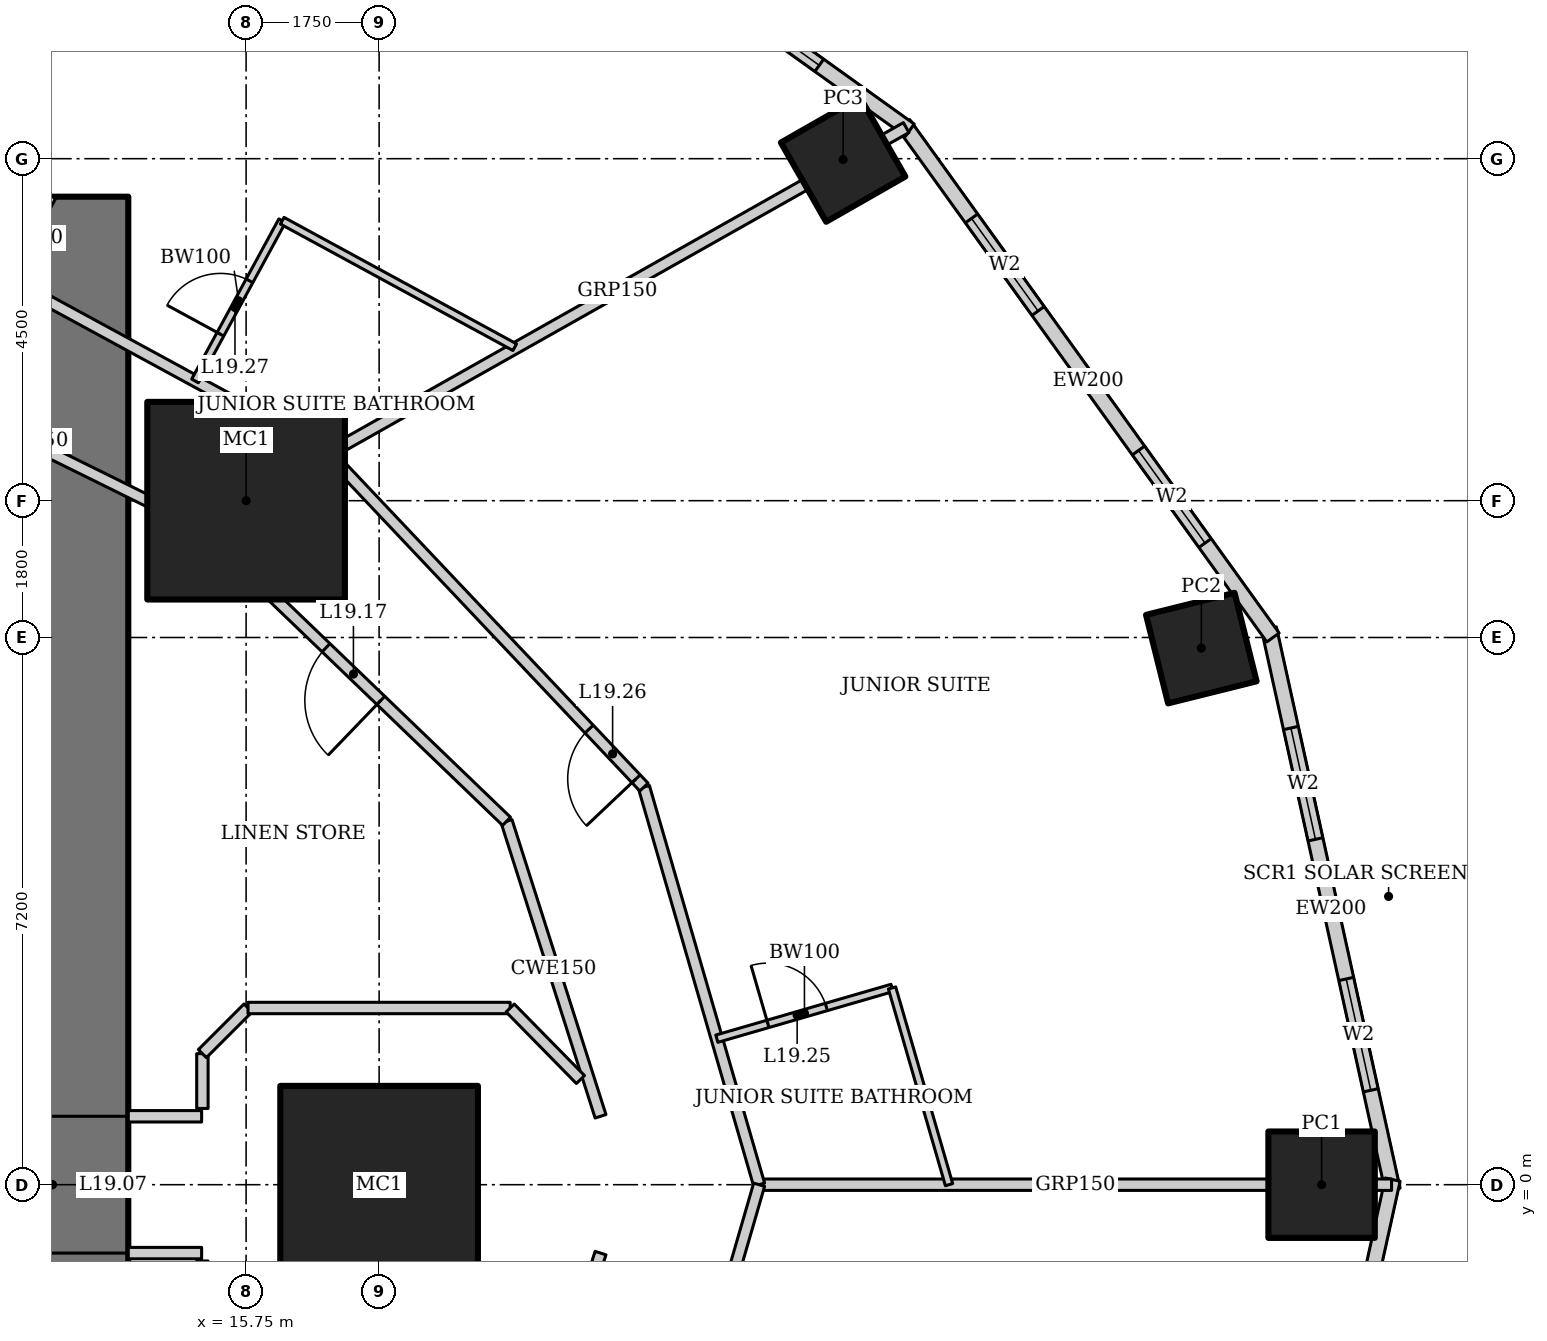
"""IFC4 building model, lengths in metres.
Left out: names, types, materials, properties, quantities, classifications, styles, units other than length and angle.
Written with IfcOpenShell. Run it as: python <this file> out.ifc"""

import sys

from ifc_helpers import new_model, si_unit, direction, frame, frame_2d, origin, origin_2d, place, context, subcontext, project, spatial, rectangle, hollow_rectangle, extrude, element, fill, save


model = new_model("IFC4")
c1 = context("Model", 3, precision=1e-05, world=origin(), true_north=direction((0.0, 1.0)))
c2 = subcontext(c1, "Body", "Model", "MODEL_VIEW")
j1 = project(units=[si_unit("LENGTHUNIT", "METRE"), si_unit("PLANEANGLEUNIT", "RADIAN")], contexts=[c1])
p1 = place(None, origin())
s1 = spatial("IfcSite", under=j1, at=p1, CompositionType="ELEMENT")
p2 = place(p1, origin())
s2 = spatial("IfcBuilding", under=s1, at=p2, CompositionType="ELEMENT")
p3 = place(p2, frame((0.0, 0.0, 83.8)))
s3 = spatial("IfcBuildingStorey", under=s2, at=p3, CompositionType="ELEMENT", Elevation=83.8)
for number, where, z_axis, x_axis in (
    (1, (17.5, 0.0, 0.0), (0.0, 0.0, 1.0), (1.0, 0.0, 0.0)),
    (2, (15.75, 9.0, 0.0), (0.0, 0.0, 1.0), (1.0, 0.0, 0.0)),
):
    element("IfcColumn", number, at=place(p3, frame(where, z_axis=z_axis, x_axis=x_axis)), inside=s3, PredefinedType="COLUMN", context=c2, shape_type="SweptSolid", body=[
        extrude(hollow_rectangle(XDim=2.6, YDim=2.6, WallThickness=0.13, at=origin_2d()), origin(), (0.0, 0.0, 1.0), 3.6),
    ])
p4 = place(p3, frame((29.9, 0.0, 0.0), z_axis=(0.0, 0.0, 1.0), x_axis=(1.0, 0.0, 0.0)))
e3 = element("IfcColumn", 3, at=p4, inside=s3, PredefinedType="COLUMN", context=c2, shape_type="SweptSolid", body=[
    extrude(hollow_rectangle(XDim=1.4, YDim=1.4, WallThickness=0.1, at=origin_2d()), origin(), (0.0, 0.0, 1.0), 3.6),
])
p5 = place(p3, frame((28.318, 7.06, 0.0), z_axis=(0.0, 0.0, 1.0), x_axis=(0.970295726276, 0.2419218956, 0.0)))
e4 = element("IfcColumn", 4, at=p5, inside=s3, PredefinedType="COLUMN", context=c2, shape_type="SweptSolid", body=[
    extrude(hollow_rectangle(XDim=1.2, YDim=1.2, WallThickness=0.1, at=origin_2d()), origin(), (0.0, 0.0, 1.0), 3.6),
])
p6 = place(p3, frame((23.605, 13.489, 0.0), z_axis=(0.0, 0.0, 1.0), x_axis=(0.86824298017, 0.496139221777, 0.0)))
e5 = element("IfcColumn", 5, at=p6, inside=s3, PredefinedType="COLUMN", context=c2, shape_type="SweptSolid", body=[
    extrude(hollow_rectangle(XDim=1.2, YDim=1.2, WallThickness=0.12, at=origin_2d()), origin(), (0.0, 0.0, 1.0), 3.6),
])
p7 = place(p3, frame((13.2, -13.0, 0.0), z_axis=(0.0, 0.0, 1.0), x_axis=(0.0, 1.0, 0.0)))
e6 = element("IfcWall", 6, at=p7, inside=s3, PredefinedType="SHEAR", context=c2, shape_type="SweptSolid", body=[
    extrude(rectangle(XDim=26.0, YDim=2.0, at=frame_2d((13.0, 0.0))), origin(), (0.0, 0.0, 1.0), 3.6),
])
p8 = place(p7, frame((12.1, 0.0, 0.0)))
e7 = element("IfcOpeningElement", 7, at=p8, cuts=e6, PredefinedType="OPENING", context=c2, shape_type="SweptSolid", body=[
    extrude(rectangle(XDim=1.8, YDim=2.1, at=frame_2d((0.9, 1.05))), frame((0.0, 1.01, 0.0), z_axis=(0.0, -1.0, 0.0), x_axis=(1.0, 0.0, 0.0)), (0.0, 0.0, 1.0), 2.02),
])
p9 = place(p3, frame((30.835, -0.067, 0.0), z_axis=(0.0, 0.0, 1.0), x_axis=(-0.215238065514, 0.976561608478, 0.0)))
e8 = element("IfcWall", 8, at=p9, inside=s3, PredefinedType="SOLIDWALL", context=c2, shape_type="SweptSolid", body=[
    extrude(rectangle(XDim=7.562, YDim=0.2, at=frame_2d((3.781, 0.0))), origin(), (0.0, 0.0, 1.0), 3.45),
])
p10 = place(p9, frame((1.341, 0.0, 0.5)))
e9 = element("IfcOpeningElement", 9, at=p10, cuts=e8, PredefinedType="OPENING", context=c2, shape_type="SweptSolid", body=[
    extrude(rectangle(XDim=1.5, YDim=2.2, at=frame_2d((0.75, 1.1))), frame((0.0, 0.11, 0.0), z_axis=(0.0, -1.0, 0.0), x_axis=(1.0, 0.0, 0.0)), (0.0, 0.0, 1.0), 0.22),
])
p11 = place(p9, frame((4.722, 0.0, 0.5)))
e10 = element("IfcOpeningElement", 10, at=p11, cuts=e8, PredefinedType="OPENING", context=c2, shape_type="SweptSolid", body=[
    extrude(rectangle(XDim=1.5, YDim=2.2, at=frame_2d((0.75, 1.1))), frame((0.0, 0.11, 0.0), z_axis=(0.0, -1.0, 0.0), x_axis=(1.0, 0.0, 0.0)), (0.0, 0.0, 1.0), 0.22),
])
p12 = place(p3, frame((29.26, 7.2, 0.0), z_axis=(0.0, 0.0, 1.0), x_axis=(-0.583937613703, 0.811798536155, 0.0)))
e11 = element("IfcWall", 11, at=p12, inside=s3, PredefinedType="SOLIDWALL", context=c2, shape_type="SweptSolid", body=[
    extrude(rectangle(XDim=8.323, YDim=0.2, at=frame_2d((4.162, 0.0))), origin(), (0.0, 0.0, 1.0), 3.45),
])
p13 = place(p12, frame((1.531, 0.0, 0.5)))
e12 = element("IfcOpeningElement", 12, at=p13, cuts=e11, PredefinedType="OPENING", context=c2, shape_type="SweptSolid", body=[
    extrude(rectangle(XDim=1.5, YDim=2.2, at=frame_2d((0.75, 1.1))), frame((0.0, 0.11, 0.0), z_axis=(0.0, -1.0, 0.0), x_axis=(1.0, 0.0, 0.0)), (0.0, 0.0, 1.0), 0.22),
])
p14 = place(p12, frame((5.292, 0.0, 0.5)))
e13 = element("IfcOpeningElement", 13, at=p14, cuts=e11, PredefinedType="OPENING", context=c2, shape_type="SweptSolid", body=[
    extrude(rectangle(XDim=1.5, YDim=2.2, at=frame_2d((0.75, 1.1))), frame((0.0, 0.11, 0.0), z_axis=(0.0, -1.0, 0.0), x_axis=(1.0, 0.0, 0.0)), (0.0, 0.0, 1.0), 0.22),
])
p15 = place(p3, frame((24.482, 13.875, 0.0), z_axis=(0.0, 0.0, 1.0), x_axis=(-0.812791321576, 0.582554948112, 0.0)))
e14 = element("IfcWall", 14, at=p15, inside=s3, PredefinedType="SOLIDWALL", context=c2, shape_type="SweptSolid", body=[
    extrude(rectangle(XDim=8.063, YDim=0.2, at=frame_2d((4.032, 0.0))), origin(), (0.0, 0.0, 1.0), 3.45),
])
p16 = place(p15, frame((1.466, 0.0, 0.5)))
e15 = element("IfcOpeningElement", 15, at=p16, cuts=e14, PredefinedType="OPENING", context=c2, shape_type="SweptSolid", body=[
    extrude(rectangle(XDim=1.5, YDim=2.2, at=frame_2d((0.75, 1.1))), frame((0.0, 0.11, 0.0), z_axis=(0.0, -1.0, 0.0), x_axis=(1.0, 0.0, 0.0)), (0.0, 0.0, 1.0), 0.22),
])
p17 = place(p15, frame((5.097, 0.0, 0.5)))
e16 = element("IfcOpeningElement", 16, at=p17, cuts=e14, PredefinedType="OPENING", context=c2, shape_type="SweptSolid", body=[
    extrude(rectangle(XDim=1.5, YDim=2.2, at=frame_2d((0.75, 1.1))), frame((0.0, 0.11, 0.0), z_axis=(0.0, -1.0, 0.0), x_axis=(1.0, 0.0, 0.0)), (0.0, 0.0, 1.0), 0.22),
])
p18 = place(p3, frame((29.208, -7.318, 0.0), z_axis=(0.0, 0.0, 1.0), x_axis=(0.215238065514, 0.976561608478, 0.0)))
e17 = element("IfcWall", 17, at=p18, inside=s3, PredefinedType="SOLIDWALL", context=c2, shape_type="SweptSolid", body=[
    extrude(rectangle(XDim=7.562, YDim=0.2, at=frame_2d((3.781, 0.0))), origin(), (0.0, 0.0, 1.0), 3.45),
])
p19 = place(p18, frame((1.341, 0.0, 0.5)))
e18 = element("IfcOpeningElement", 18, at=p19, cuts=e17, PredefinedType="OPENING", context=c2, shape_type="SweptSolid", body=[
    extrude(rectangle(XDim=1.5, YDim=2.2, at=frame_2d((0.75, 1.1))), frame((0.0, 0.11, 0.0), z_axis=(0.0, -1.0, 0.0), x_axis=(1.0, 0.0, 0.0)), (0.0, 0.0, 1.0), 0.22),
])
p20 = place(p18, frame((4.722, 0.0, 0.5)))
e19 = element("IfcOpeningElement", 19, at=p20, cuts=e17, PredefinedType="OPENING", context=c2, shape_type="SweptSolid", body=[
    extrude(rectangle(XDim=1.5, YDim=2.2, at=frame_2d((0.75, 1.1))), frame((0.0, 0.11, 0.0), z_axis=(0.0, -1.0, 0.0), x_axis=(1.0, 0.0, 0.0)), (0.0, 0.0, 1.0), 0.22),
])
p21 = place(p3, frame((30.821, 0.0, 0.0), z_axis=(0.0, 0.0, 1.0), x_axis=(-1.0, 0.0, 0.0)))
e20 = element("IfcWall", 20, at=p21, inside=s3, PredefinedType="PARTITIONING", context=c2, shape_type="SweptSolid", body=[
    extrude(rectangle(XDim=8.321, YDim=0.15, at=frame_2d((4.16, 0.0))), origin(), (0.0, 0.0, 1.0), 2.528),
])
p22 = place(p3, frame((24.435, 13.909, 0.0), z_axis=(0.0, 0.0, 1.0), x_axis=(-0.87090601027, -0.491449612143, 0.0)))
e21 = element("IfcWall", 21, at=p22, inside=s3, PredefinedType="PARTITIONING", context=c2, shape_type="SweptSolid", body=[
    extrude(rectangle(XDim=8.726, YDim=0.15, at=frame_2d((4.363, 0.0))), origin(), (0.0, 0.0, 1.0), 2.693),
])
p23 = place(p3, frame((22.5, 0.0, 0.0), z_axis=(0.0, 0.0, 1.0), x_axis=(-0.278247435376, 0.960509429785, 0.0)))
e22 = element("IfcWall", 22, at=p23, inside=s3, PredefinedType="PARTITIONING", context=c2, shape_type="SweptSolid", body=[
    extrude(rectangle(XDim=5.447, YDim=0.15, at=frame_2d((2.724, 0.0))), origin(), (0.0, 0.0, 1.0), 3.45),
])
p24 = place(p3, frame((20.984, 5.232, 0.0), z_axis=(0.0, 0.0, 1.0), x_axis=(-0.687062608696, 0.726598218916, 0.0)))
e23 = element("IfcWall", 23, at=p24, inside=s3, PredefinedType="PARTITIONING", context=c2, shape_type="SweptSolid", body=[
    extrude(rectangle(XDim=6.039, YDim=0.15, at=frame_2d((3.02, 0.0))), origin(), (0.0, 0.0, 1.0), 3.45),
])
p25 = place(p24, frame((0.15, 0.0, 0.0)))
e24 = element("IfcOpeningElement", 24, at=p25, cuts=e23, PredefinedType="OPENING", context=c2, shape_type="SweptSolid", body=[
    extrude(rectangle(XDim=0.9, YDim=2.1, at=frame_2d((0.45, 1.05))), frame((0.0, 0.085, 0.0), z_axis=(0.0, -1.0, 0.0), x_axis=(1.0, 0.0, 0.0)), (0.0, 0.0, 1.0), 0.17),
])
p26 = place(p3, frame((16.835, 9.62, 0.0), z_axis=(0.0, 0.0, 1.0), x_axis=(-0.878450059298, 0.477834169267, 0.0)))
e25 = element("IfcWall", 25, at=p26, inside=s3, PredefinedType="PARTITIONING", context=c2, shape_type="SweptSolid", body=[
    extrude(rectangle(XDim=5.631, YDim=0.15, at=frame_2d((2.815, 0.0))), origin(), (0.0, 0.0, 1.0), 3.45),
])
p27 = place(p3, frame((20.984, -5.232, 0.0), z_axis=(0.0, 0.0, 1.0), x_axis=(0.278247435376, 0.960509429785, 0.0)))
e26 = element("IfcWall", 26, at=p27, inside=s3, PredefinedType="PARTITIONING", context=c2, shape_type="SweptSolid", body=[
    extrude(rectangle(XDim=5.447, YDim=0.15, at=frame_2d((2.724, 0.0))), origin(), (0.0, 0.0, 1.0), 3.45),
])
p28 = place(p27, frame((0.15, 0.0, 0.0)))
e27 = element("IfcOpeningElement", 27, at=p28, cuts=e26, PredefinedType="OPENING", context=c2, shape_type="SweptSolid", body=[
    extrude(rectangle(XDim=0.9, YDim=2.1, at=frame_2d((0.45, 1.05))), frame((0.0, 0.085, 0.0), z_axis=(0.0, -1.0, 0.0), x_axis=(1.0, 0.0, 0.0)), (0.0, 0.0, 1.0), 0.17),
])
p29 = place(p3, frame((20.413, 0.9, 0.0), z_axis=(0.0, 0.0, 1.0), x_axis=(-0.303505448228, 0.952829702988, 0.0)))
e28 = element("IfcWall", 28, at=p29, inside=s3, PredefinedType="PARTITIONING", context=c2, shape_type="SweptSolid", body=[
    extrude(rectangle(XDim=4.073, YDim=0.15, at=frame_2d((2.037, 0.0))), origin(), (0.0, 0.0, 1.0), 3.45),
])
p30 = place(p3, frame((19.177, 4.781, 0.0), z_axis=(0.0, 0.0, 1.0), x_axis=(-0.720837261072, 0.693104352209, 0.0)))
e29 = element("IfcWall", 29, at=p30, inside=s3, PredefinedType="PARTITIONING", context=c2, shape_type="SweptSolid", body=[
    extrude(rectangle(XDim=5.59, YDim=0.15, at=frame_2d((2.795, 0.0))), origin(), (0.0, 0.0, 1.0), 3.45),
])
p31 = place(p30, frame((2.295, 0.0, 0.0)))
e30 = element("IfcOpeningElement", 30, at=p31, cuts=e29, PredefinedType="OPENING", context=c2, shape_type="SweptSolid", body=[
    extrude(rectangle(XDim=1.0, YDim=2.1, at=frame_2d((0.5, 1.05))), frame((0.0, 0.085, 0.0), z_axis=(0.0, -1.0, 0.0), x_axis=(1.0, 0.0, 0.0)), (0.0, 0.0, 1.0), 0.17),
])
p32 = place(p3, frame((15.147, 8.656, 0.0), z_axis=(0.0, 0.0, 1.0), x_axis=(-0.89656943448, 0.442903205177, 0.0)))
e31 = element("IfcWall", 31, at=p32, inside=s3, PredefinedType="PARTITIONING", context=c2, shape_type="SweptSolid", body=[
    extrude(rectangle(XDim=5.126, YDim=0.15, at=frame_2d((2.563, 0.0))), origin(), (0.0, 0.0, 1.0), 3.45),
])
p33 = place(p3, frame((19.177, -4.781, 0.0), z_axis=(0.0, 0.0, 1.0), x_axis=(0.303505448228, 0.952829702988, 0.0)))
e32 = element("IfcWall", 32, at=p33, inside=s3, PredefinedType="PARTITIONING", context=c2, shape_type="SweptSolid", body=[
    extrude(rectangle(XDim=4.073, YDim=0.15, at=frame_2d((2.037, 0.0))), origin(), (0.0, 0.0, 1.0), 3.45),
])
p34 = place(p3, frame((21.943, 1.921, 0.0), z_axis=(0.0, 0.0, 1.0), x_axis=(0.960496317326, 0.278292695563, 0.0)))
e33 = element("IfcWall", 33, at=p34, inside=s3, PredefinedType="PARTITIONING", context=c2, shape_type="SweptSolid", body=[
    extrude(rectangle(XDim=2.4, YDim=0.1, at=frame_2d((1.2, 0.0))), origin(), (0.0, 0.0, 1.0), 3.45),
])
p35 = place(p34, frame((0.7, 0.0, 0.0)))
e34 = element("IfcOpeningElement", 34, at=p35, cuts=e33, PredefinedType="OPENING", context=c2, shape_type="SweptSolid", body=[
    extrude(rectangle(XDim=0.8, YDim=2.1, at=frame_2d((0.4, 1.05))), frame((0.0, 0.06, 0.0), z_axis=(0.0, -1.0, 0.0), x_axis=(1.0, 0.0, 0.0)), (0.0, 0.0, 1.0), 0.12),
])
p36 = place(p3, frame((24.249, 2.589, 0.0), z_axis=(0.0, 0.0, 1.0), x_axis=(0.278260412958, -0.960505670249, 0.0)))
e35 = element("IfcWall", 35, at=p36, inside=s3, PredefinedType="PARTITIONING", context=c2, shape_type="SweptSolid", body=[
    extrude(rectangle(XDim=2.695, YDim=0.1, at=frame_2d((1.348, 0.0))), origin(), (0.0, 0.0, 1.0), 3.45),
])
p37 = place(p3, frame((15.078, 10.576, 0.0), z_axis=(0.0, 0.0, 1.0), x_axis=(0.477832549678, 0.878450940274, 0.0)))
e36 = element("IfcWall", 36, at=p37, inside=s3, PredefinedType="PARTITIONING", context=c2, shape_type="SweptSolid", body=[
    extrude(rectangle(XDim=2.4, YDim=0.1, at=frame_2d((1.2, 0.0))), origin(), (0.0, 0.0, 1.0), 3.45),
])
p38 = place(p37, frame((0.7, 0.0, 0.0)))
e37 = element("IfcOpeningElement", 37, at=p38, cuts=e36, PredefinedType="OPENING", context=c2, shape_type="SweptSolid", body=[
    extrude(rectangle(XDim=0.8, YDim=2.1, at=frame_2d((0.4, 1.05))), frame((0.0, 0.06, 0.0), z_axis=(0.0, -1.0, 0.0), x_axis=(1.0, 0.0, 0.0)), (0.0, 0.0, 1.0), 0.12),
])
p39 = place(p3, frame((16.225, 12.684, 0.0), z_axis=(0.0, 0.0, 1.0), x_axis=(0.878473578893, -0.477790928322, 0.0)))
e38 = element("IfcWall", 38, at=p39, inside=s3, PredefinedType="PARTITIONING", context=c2, shape_type="SweptSolid", body=[
    extrude(rectangle(XDim=3.483, YDim=0.1, at=frame_2d((1.741, 0.0))), origin(), (0.0, 0.0, 1.0), 3.45),
])
p40 = place(p3, frame((13.2, 13.0, 0.0), z_axis=(0.0, 0.0, 1.0), x_axis=(-0.477852414256, -0.878440134665, 0.0)))
e39 = element("IfcWall", 39, at=p40, inside=s3, PredefinedType="PARTITIONING", context=c2, shape_type="SweptSolid", body=[
    extrude(rectangle(XDim=1.232, YDim=0.1, at=frame_2d((0.616, 0.0))), origin(), (0.0, 0.0, 1.0), 3.45),
])
for number, where, z_axis, x_axis in (
    (40, (14.2, -0.9, 0.0), (0.0, 0.0, 1.0), (1.0, 0.0, 0.0)),
    (41, (14.2, 0.9, 0.0), (0.0, 0.0, 1.0), (1.0, 0.0, 0.0)),
):
    element("IfcWall", number, at=place(p3, frame(where, z_axis=z_axis, x_axis=x_axis)), inside=s3, PredefinedType="PARTITIONING", context=c2, shape_type="SweptSolid", body=[
        extrude(rectangle(XDim=0.965, YDim=0.15, at=frame_2d((0.482, 0.0))), origin(), (0.0, 0.0, 1.0), 3.45),
    ])
p41 = place(p3, frame((15.175, 1.003, 0.0), z_axis=(0.0, 0.0, 1.0), x_axis=(0.0, 1.0, 0.0)))
e42 = element("IfcWall", 42, at=p41, inside=s3, PredefinedType="PARTITIONING", context=c2, shape_type="SweptSolid", body=[
    extrude(rectangle(XDim=0.721, YDim=0.15, at=frame_2d((0.361, 0.0))), origin(), (0.0, 0.0, 1.0), 3.45),
])
p42 = place(p3, frame((15.175, 1.725, 0.0), z_axis=(0.0, 0.0, 1.0), x_axis=(0.707106781187, 0.707106781187, 0.0)))
e43 = element("IfcWall", 43, at=p42, inside=s3, PredefinedType="PARTITIONING", context=c2, shape_type="SweptSolid", body=[
    extrude(rectangle(XDim=0.849, YDim=0.15, at=frame_2d((0.425, 0.0))), origin(), (0.0, 0.0, 1.0), 3.45),
])
p43 = place(p3, frame((15.775, 2.325, 0.0), z_axis=(0.0, 0.0, 1.0), x_axis=(1.0, 0.0, 0.0)))
e44 = element("IfcWall", 44, at=p43, inside=s3, PredefinedType="PARTITIONING", context=c2, shape_type="SweptSolid", body=[
    extrude(rectangle(XDim=3.449, YDim=0.15, at=frame_2d((1.725, 0.0))), origin(), (0.0, 0.0, 1.0), 3.45),
])
p44 = place(p3, frame((19.225, 2.325, 0.0), z_axis=(0.0, 0.0, 1.0), x_axis=(0.700694560486, -0.713461374501, 0.0)))
e45 = element("IfcWall", 45, at=p44, inside=s3, PredefinedType="PARTITIONING", context=c2, shape_type="SweptSolid", body=[
    extrude(rectangle(XDim=1.32, YDim=0.15, at=frame_2d((0.66, 0.0))), origin(), (0.0, 0.0, 1.0), 3.45),
])
p45 = place(p10, origin())
e46 = element("IfcWindow", 46, at=p45, inside=s3, PartitioningType="SINGLE_PANEL", PredefinedType="WINDOW", context=c2, shape_type="SweptSolid", body=[
    extrude(rectangle(XDim=1.5, YDim=2.2, at=frame_2d((0.75, 1.1))), frame((0.0, 0.03, 0.0), z_axis=(0.0, -1.0, 0.0), x_axis=(1.0, 0.0, 0.0)), (0.0, 0.0, 1.0), 0.06),
])
fill(e9, e46)
p46 = place(p11, origin())
e47 = element("IfcWindow", 47, at=p46, inside=s3, PartitioningType="SINGLE_PANEL", PredefinedType="WINDOW", context=c2, shape_type="SweptSolid", body=[
    extrude(rectangle(XDim=1.5, YDim=2.2, at=frame_2d((0.75, 1.1))), frame((0.0, 0.03, 0.0), z_axis=(0.0, -1.0, 0.0), x_axis=(1.0, 0.0, 0.0)), (0.0, 0.0, 1.0), 0.06),
])
fill(e10, e47)
p47 = place(p13, origin())
e48 = element("IfcWindow", 48, at=p47, inside=s3, PartitioningType="SINGLE_PANEL", PredefinedType="WINDOW", context=c2, shape_type="SweptSolid", body=[
    extrude(rectangle(XDim=1.5, YDim=2.2, at=frame_2d((0.75, 1.1))), frame((0.0, 0.03, 0.0), z_axis=(0.0, -1.0, 0.0), x_axis=(1.0, 0.0, 0.0)), (0.0, 0.0, 1.0), 0.06),
])
fill(e12, e48)
p48 = place(p14, origin())
e49 = element("IfcWindow", 49, at=p48, inside=s3, PartitioningType="SINGLE_PANEL", PredefinedType="WINDOW", context=c2, shape_type="SweptSolid", body=[
    extrude(rectangle(XDim=1.5, YDim=2.2, at=frame_2d((0.75, 1.1))), frame((0.0, 0.03, 0.0), z_axis=(0.0, -1.0, 0.0), x_axis=(1.0, 0.0, 0.0)), (0.0, 0.0, 1.0), 0.06),
])
fill(e13, e49)
p49 = place(p16, origin())
e50 = element("IfcWindow", 50, at=p49, inside=s3, PartitioningType="SINGLE_PANEL", PredefinedType="WINDOW", context=c2, shape_type="SweptSolid", body=[
    extrude(rectangle(XDim=1.5, YDim=2.2, at=frame_2d((0.75, 1.1))), frame((0.0, 0.03, 0.0), z_axis=(0.0, -1.0, 0.0), x_axis=(1.0, 0.0, 0.0)), (0.0, 0.0, 1.0), 0.06),
])
fill(e15, e50)
p50 = place(p8, origin())
e51 = element("IfcDoor", 51, at=p50, inside=s3, OperationType="DOUBLE_DOOR_DOUBLE_SWING", PredefinedType="DOOR", context=c2, shape_type="SweptSolid", body=[
    extrude(rectangle(XDim=1.8, YDim=2.1, at=frame_2d((0.9, 1.05))), frame((0.0, 0.025, 0.0), z_axis=(0.0, -1.0, 0.0), x_axis=(1.0, 0.0, 0.0)), (0.0, 0.0, 1.0), 0.05),
])
fill(e7, e51)
p51 = place(p31, origin())
e52 = element("IfcDoor", 52, at=p51, inside=s3, OperationType="SINGLE_SWING_LEFT", PredefinedType="DOOR", context=c2, shape_type="SweptSolid", body=[
    extrude(rectangle(XDim=1.0, YDim=2.1, at=frame_2d((0.5, 1.05))), frame((0.0, 0.025, 0.0), z_axis=(0.0, -1.0, 0.0), x_axis=(1.0, 0.0, 0.0)), (0.0, 0.0, 1.0), 0.05),
])
fill(e30, e52)
p52 = place(p35, origin())
e53 = element("IfcDoor", 53, at=p52, inside=s3, OperationType="SINGLE_SWING_LEFT", PredefinedType="DOOR", context=c2, shape_type="SweptSolid", body=[
    extrude(rectangle(XDim=0.8, YDim=2.1, at=frame_2d((0.4, 1.05))), frame((0.0, 0.025, 0.0), z_axis=(0.0, -1.0, 0.0), x_axis=(1.0, 0.0, 0.0)), (0.0, 0.0, 1.0), 0.05),
])
fill(e34, e53)
p53 = place(p25, origin())
e54 = element("IfcDoor", 54, at=p53, inside=s3, OperationType="SINGLE_SWING_LEFT", PredefinedType="DOOR", context=c2, shape_type="SweptSolid", body=[
    extrude(rectangle(XDim=0.9, YDim=2.1, at=frame_2d((0.45, 1.05))), frame((0.0, 0.025, 0.0), z_axis=(0.0, -1.0, 0.0), x_axis=(1.0, 0.0, 0.0)), (0.0, 0.0, 1.0), 0.05),
])
fill(e24, e54)
p54 = place(p38, origin())
e55 = element("IfcDoor", 55, at=p54, inside=s3, OperationType="SINGLE_SWING_LEFT", PredefinedType="DOOR", context=c2, shape_type="SweptSolid", body=[
    extrude(rectangle(XDim=0.8, YDim=2.1, at=frame_2d((0.4, 1.05))), frame((0.0, 0.025, 0.0), z_axis=(0.0, -1.0, 0.0), x_axis=(1.0, 0.0, 0.0)), (0.0, 0.0, 1.0), 0.05),
])
fill(e37, e55)
save(model, sys.argv[1])
